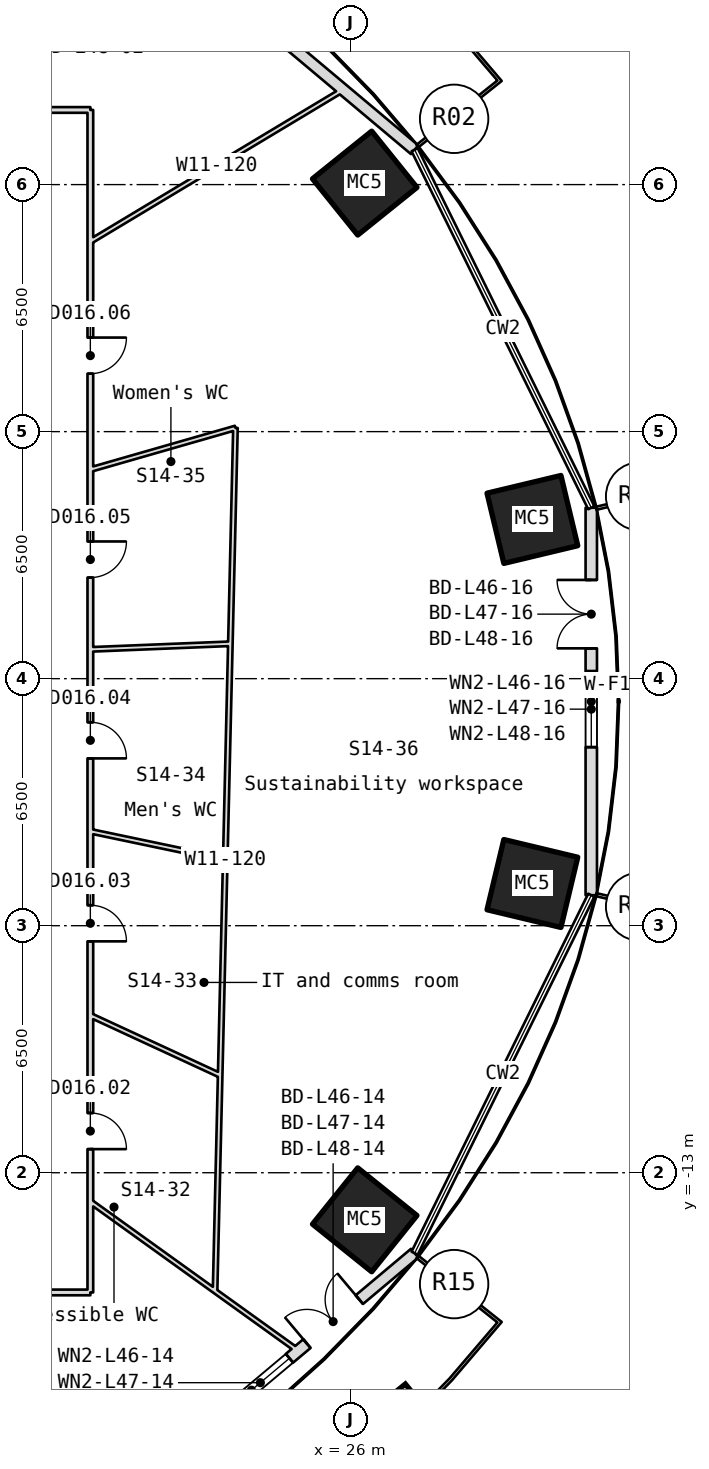
"""IFC4 building model, lengths in metres.
Left out: names, types, materials, properties, quantities, classifications, styles, units other than length and angle.
Written with IfcOpenShell. Run it as: python <this file> out.ifc"""

import sys

from ifc_helpers import new_model, si_unit, direction, frame, frame_2d, origin, origin_2d, place, context, subcontext, project, spatial, rectangle, hollow_rectangle, extrude, element, fill, save


model = new_model("IFC4")
c1 = context("Model", 3, precision=1e-05, world=origin(), true_north=direction((0.0, 1.0)))
c2 = subcontext(c1, "Body", "Model", "MODEL_VIEW")
j1 = project(units=[si_unit("LENGTHUNIT", "METRE"), si_unit("PLANEANGLEUNIT", "RADIAN")], contexts=[c1])
p1 = place(None, origin())
s1 = spatial("IfcSite", under=j1, at=p1, CompositionType="ELEMENT")
p2 = place(p1, origin())
s2 = spatial("IfcBuilding", under=s1, at=p2, CompositionType="ELEMENT")
p3 = place(p2, frame((0.0, 0.0, 210.85)))
s3 = spatial("IfcBuildingStorey", under=s2, at=p3, CompositionType="ELEMENT", Elevation=210.85)
for number, where, z_axis, x_axis in (
    (1, (30.782, 4.189, -0.18), (0.0, 0.0, 1.0), (0.233, -0.973, 0.0)),
    (2, (26.37, 13.039, -0.18), (0.0, 0.0, 1.0), (0.627, -0.779, 0.0)),
    (3, (26.37, -14.239, -0.18), (0.0, 0.0, 1.0), (-0.627, -0.779, 0.0)),
    (4, (30.782, -5.389, -0.18), (0.0, 0.0, 1.0), (-0.233, -0.973, 0.0)),
):
    element("IfcColumn", number, at=place(p3, frame(where, z_axis=z_axis, x_axis=x_axis)), inside=s3, PredefinedType="COLUMN", context=c2, shape_type="SweptSolid", body=[
        extrude(hollow_rectangle(XDim=1.9, YDim=2.0, WallThickness=0.07, at=origin_2d()), origin(), (0.0, 0.0, 1.0), 4.15),
    ])
p4 = place(p3, frame((27.684, 13.917, 0.0), z_axis=(0.0, 0.0, 1.0), x_axis=(-0.76593385613, 0.642919379109, 0.0)))
e5 = element("IfcWall", 5, at=p4, inside=s3, PredefinedType="SOLIDWALL", context=c2, shape_type="SweptSolid", body=[
    extrude(rectangle(XDim=11.213, YDim=0.3, at=frame_2d((5.607, 0.0))), origin(), (0.0, 0.0, 1.0), 3.97),
])
p5 = place(p4, frame((7.513, 0.0, 0.0)))
e6 = element("IfcOpeningElement", 6, at=p5, cuts=e5, PredefinedType="OPENING", context=c2, shape_type="SweptSolid", body=[
    extrude(rectangle(XDim=1.8, YDim=2.4, at=frame_2d((0.9, 1.2))), frame((0.0, 0.16, 0.0), z_axis=(0.0, -1.0, 0.0), x_axis=(1.0, 0.0, 0.0)), (0.0, 0.0, 1.0), 0.32),
])
p6 = place(p4, frame((4.913, 0.0, 0.9)))
e7 = element("IfcOpeningElement", 7, at=p6, cuts=e5, PredefinedType="OPENING", context=c2, shape_type="SweptSolid", body=[
    extrude(rectangle(XDim=2.0, YDim=1.5, at=frame_2d((1.0, 0.75))), frame((0.0, 0.16, 0.0), z_axis=(0.0, -1.0, 0.0), x_axis=(1.0, 0.0, 0.0)), (0.0, 0.0, 1.0), 0.32),
])
p7 = place(p3, frame((19.095, -22.326, 0.0), z_axis=(0.0, 0.0, 1.0), x_axis=(0.76593385613, 0.642919379109, 0.0)))
e8 = element("IfcWall", 8, at=p7, inside=s3, PredefinedType="SOLIDWALL", context=c2, shape_type="SweptSolid", body=[
    extrude(rectangle(XDim=11.213, YDim=0.3, at=frame_2d((5.607, 0.0))), origin(), (0.0, 0.0, 1.0), 3.97),
])
p8 = place(p7, frame((7.513, 0.0, 0.0)))
e9 = element("IfcOpeningElement", 9, at=p8, cuts=e8, PredefinedType="OPENING", context=c2, shape_type="SweptSolid", body=[
    extrude(rectangle(XDim=1.8, YDim=2.4, at=frame_2d((0.9, 1.2))), frame((0.0, 0.16, 0.0), z_axis=(0.0, -1.0, 0.0), x_axis=(1.0, 0.0, 0.0)), (0.0, 0.0, 1.0), 0.32),
])
p9 = place(p7, frame((4.913, 0.0, 0.9)))
e10 = element("IfcOpeningElement", 10, at=p9, cuts=e8, PredefinedType="OPENING", context=c2, shape_type="SweptSolid", body=[
    extrude(rectangle(XDim=2.0, YDim=1.5, at=frame_2d((1.0, 0.75))), frame((0.0, 0.16, 0.0), z_axis=(0.0, -1.0, 0.0), x_axis=(1.0, 0.0, 0.0)), (0.0, 0.0, 1.0), 0.32),
])
p10 = place(p3, frame((32.332, -5.698, 0.0), z_axis=(0.0, 0.0, 1.0), x_axis=(0.0, 1.0, 0.0)))
e11 = element("IfcWall", 11, at=p10, inside=s3, PredefinedType="SOLIDWALL", context=c2, shape_type="SweptSolid", body=[
    extrude(rectangle(XDim=10.196, YDim=0.3, at=frame_2d((5.098, 0.0))), origin(), (0.0, 0.0, 1.0), 3.97),
])
p11 = place(p10, frame((6.495, 0.0, 0.0)))
e12 = element("IfcOpeningElement", 12, at=p11, cuts=e11, PredefinedType="OPENING", context=c2, shape_type="SweptSolid", body=[
    extrude(rectangle(XDim=1.8, YDim=2.4, at=frame_2d((0.9, 1.2))), frame((0.0, 0.16, 0.0), z_axis=(0.0, -1.0, 0.0), x_axis=(1.0, 0.0, 0.0)), (0.0, 0.0, 1.0), 0.32),
])
p12 = place(p10, frame((3.896, 0.0, 0.9)))
e13 = element("IfcOpeningElement", 13, at=p12, cuts=e11, PredefinedType="OPENING", context=c2, shape_type="SweptSolid", body=[
    extrude(rectangle(XDim=2.0, YDim=1.5, at=frame_2d((1.0, 0.75))), frame((0.0, 0.16, 0.0), z_axis=(0.0, -1.0, 0.0), x_axis=(1.0, 0.0, 0.0)), (0.0, 0.0, 1.0), 0.32),
])
p13 = place(p3, frame((16.45, 14.964, 0.0), z_axis=(0.0, 0.0, 1.0), x_axis=(1.0, 0.0, 0.0)))
e14 = element("IfcWall", 14, at=p13, inside=s3, PredefinedType="PARTITIONING", context=c2, shape_type="SweptSolid", body=[
    extrude(rectangle(XDim=2.7, YDim=0.15, at=frame_2d((1.35, 0.0))), origin(), (0.0, 0.0, 1.0), 3.97),
])
p14 = place(p3, frame((19.15, -16.15, 0.0), z_axis=(0.0, 0.0, 1.0), x_axis=(-1.0, 0.0, 0.0)))
e15 = element("IfcWall", 15, at=p14, inside=s3, PredefinedType="PARTITIONING", context=c2, shape_type="SweptSolid", body=[
    extrude(rectangle(XDim=38.3, YDim=0.15, at=frame_2d((19.15, 0.0))), origin(), (0.0, 0.0, 1.0), 3.97),
])
p15 = place(p14, frame((19.581, 0.0, 0.0)))
e16 = element("IfcOpeningElement", 16, at=p15, cuts=e15, PredefinedType="OPENING", context=c2, shape_type="SweptSolid", body=[
    extrude(rectangle(XDim=0.95, YDim=2.1, at=frame_2d((0.475, 1.05))), frame((0.0, 0.085, 0.0), z_axis=(0.0, -1.0, 0.0), x_axis=(1.0, 0.0, 0.0)), (0.0, 0.0, 1.0), 0.17),
])
p16 = place(p14, frame((6.981, 0.0, 0.0)))
e17 = element("IfcOpeningElement", 17, at=p16, cuts=e15, PredefinedType="OPENING", context=c2, shape_type="SweptSolid", body=[
    extrude(rectangle(XDim=1.8, YDim=2.1, at=frame_2d((0.9, 1.05))), frame((0.0, 0.085, 0.0), z_axis=(0.0, -1.0, 0.0), x_axis=(1.0, 0.0, 0.0)), (0.0, 0.0, 1.0), 0.17),
])
p17 = place(p3, frame((19.15, -13.759, 0.0), z_axis=(0.0, 0.0, 1.0), x_axis=(0.812128627043, -0.583478442736, 0.0)))
e18 = element("IfcWall", 18, at=p17, inside=s3, PredefinedType="PARTITIONING", context=c2, shape_type="SweptSolid", body=[
    extrude(rectangle(XDim=6.735, YDim=0.12, at=frame_2d((3.368, 0.0))), origin(), (0.0, 0.0, 1.0), 3.97),
])
p18 = place(p3, frame((19.15, 11.501, 0.0), z_axis=(0.0, 0.0, 1.0), x_axis=(0.857259644741, 0.514884357404, 0.0)))
e19 = element("IfcWall", 19, at=p18, inside=s3, PredefinedType="PARTITIONING", context=c2, shape_type="SweptSolid", body=[
    extrude(rectangle(XDim=7.76, YDim=0.12, at=frame_2d((3.88, 0.0))), origin(), (0.0, 0.0, 1.0), 3.97),
])
p19 = place(p3, frame((19.15, 14.964, 0.0), z_axis=(0.0, 0.0, 1.0), x_axis=(0.0, -1.0, 0.0)))
e20 = element("IfcWall", 20, at=p19, inside=s3, PredefinedType="PARTITIONING", context=c2, shape_type="SweptSolid", body=[
    extrude(rectangle(XDim=31.114, YDim=0.15, at=frame_2d((15.557, 0.0))), origin(), (0.0, 0.0, 1.0), 3.97),
])
p20 = place(p19, frame((26.393, 0.0, 0.0)))
e21 = element("IfcOpeningElement", 21, at=p20, cuts=e20, PredefinedType="OPENING", context=c2, shape_type="SweptSolid", body=[
    extrude(rectangle(XDim=0.95, YDim=2.1, at=frame_2d((0.475, 1.05))), frame((0.0, 0.085, 0.0), z_axis=(0.0, -1.0, 0.0), x_axis=(1.0, 0.0, 0.0)), (0.0, 0.0, 1.0), 0.17),
])
p21 = place(p19, frame((20.926, 0.0, 0.0)))
e22 = element("IfcOpeningElement", 22, at=p21, cuts=e20, PredefinedType="OPENING", context=c2, shape_type="SweptSolid", body=[
    extrude(rectangle(XDim=0.95, YDim=2.1, at=frame_2d((0.475, 1.05))), frame((0.0, 0.085, 0.0), z_axis=(0.0, -1.0, 0.0), x_axis=(1.0, 0.0, 0.0)), (0.0, 0.0, 1.0), 0.17),
])
p22 = place(p19, frame((16.112, 0.0, 0.0)))
e23 = element("IfcOpeningElement", 23, at=p22, cuts=e20, PredefinedType="OPENING", context=c2, shape_type="SweptSolid", body=[
    extrude(rectangle(XDim=0.95, YDim=2.1, at=frame_2d((0.475, 1.05))), frame((0.0, 0.085, 0.0), z_axis=(0.0, -1.0, 0.0), x_axis=(1.0, 0.0, 0.0)), (0.0, 0.0, 1.0), 0.17),
])
p23 = place(p19, frame((11.354, 0.0, 0.0)))
e24 = element("IfcOpeningElement", 24, at=p23, cuts=e20, PredefinedType="OPENING", context=c2, shape_type="SweptSolid", body=[
    extrude(rectangle(XDim=0.95, YDim=2.1, at=frame_2d((0.475, 1.05))), frame((0.0, 0.085, 0.0), z_axis=(0.0, -1.0, 0.0), x_axis=(1.0, 0.0, 0.0)), (0.0, 0.0, 1.0), 0.17),
])
p24 = place(p19, frame((5.989, 0.0, 0.0)))
e25 = element("IfcOpeningElement", 25, at=p24, cuts=e20, PredefinedType="OPENING", context=c2, shape_type="SweptSolid", body=[
    extrude(rectangle(XDim=0.95, YDim=2.1, at=frame_2d((0.475, 1.05))), frame((0.0, 0.085, 0.0), z_axis=(0.0, -1.0, 0.0), x_axis=(1.0, 0.0, 0.0)), (0.0, 0.0, 1.0), 0.17),
])
p25 = place(p3, frame((22.432, -16.117, 0.0), z_axis=(0.0, 0.0, 1.0), x_axis=(0.023619180301, 0.999721028248, 0.0)))
e26 = element("IfcWall", 26, at=p25, inside=s3, PredefinedType="PARTITIONING", context=c2, shape_type="SweptSolid", body=[
    extrude(rectangle(XDim=22.72, YDim=0.12, at=frame_2d((11.36, 0.0))), origin(), (0.0, 0.0, 1.0), 3.97),
])
p26 = place(p3, frame((22.566, -10.438, 0.0), z_axis=(0.0, 0.0, 1.0), x_axis=(-0.907596457225, 0.419843626643, 0.0)))
e27 = element("IfcWall", 27, at=p26, inside=s3, PredefinedType="PARTITIONING", context=c2, shape_type="SweptSolid", body=[
    extrude(rectangle(XDim=3.764, YDim=0.12, at=frame_2d((1.882, 0.0))), origin(), (0.0, 0.0, 1.0), 3.97),
])
p27 = place(p3, frame((22.7, -4.76, 0.0), z_axis=(0.0, 0.0, 1.0), x_axis=(-0.978705174883, 0.205270993219, 0.0)))
e28 = element("IfcWall", 28, at=p27, inside=s3, PredefinedType="PARTITIONING", context=c2, shape_type="SweptSolid", body=[
    extrude(rectangle(XDim=3.627, YDim=0.12, at=frame_2d((1.814, 0.0))), origin(), (0.0, 0.0, 1.0), 3.97),
])
p28 = place(p3, frame((22.834, 0.918, 0.0), z_axis=(0.0, 0.0, 1.0), x_axis=(-0.999192156412, -0.040187492641, 0.0)))
e29 = element("IfcWall", 29, at=p28, inside=s3, PredefinedType="PARTITIONING", context=c2, shape_type="SweptSolid", body=[
    extrude(rectangle(XDim=3.688, YDim=0.12, at=frame_2d((1.844, 0.0))), origin(), (0.0, 0.0, 1.0), 3.97),
])
p29 = place(p3, frame((22.969, 6.597, 0.0), z_axis=(0.0, 0.0, 1.0), x_axis=(-0.961147388984, -0.276035680028, 0.0)))
e30 = element("IfcWall", 30, at=p29, inside=s3, PredefinedType="PARTITIONING", context=c2, shape_type="SweptSolid", body=[
    extrude(rectangle(XDim=3.973, YDim=0.12, at=frame_2d((1.986, 0.0))), origin(), (0.0, 0.0, 1.0), 3.97),
])
p30 = place(p8, origin())
e31 = element("IfcDoor", 31, at=p30, inside=s3, OperationType="SINGLE_SWING_LEFT", PredefinedType="DOOR", context=c2, shape_type="SweptSolid", body=[
    extrude(rectangle(XDim=1.8, YDim=2.4, at=frame_2d((0.9, 1.2))), frame((0.0, 0.025, 0.0), z_axis=(0.0, -1.0, 0.0), x_axis=(1.0, 0.0, 0.0)), (0.0, 0.0, 1.0), 0.05),
])
fill(e9, e31)
p31 = place(p9, origin())
e32 = element("IfcWindow", 32, at=p31, inside=s3, PartitioningType="SINGLE_PANEL", PredefinedType="WINDOW", context=c2, shape_type="SweptSolid", body=[
    extrude(rectangle(XDim=2.0, YDim=1.5, at=frame_2d((1.0, 0.75))), frame((0.0, 0.03, 0.0), z_axis=(0.0, -1.0, 0.0), x_axis=(1.0, 0.0, 0.0)), (0.0, 0.0, 1.0), 0.06),
])
fill(e10, e32)
p32 = place(p11, origin())
e33 = element("IfcDoor", 33, at=p32, inside=s3, OperationType="SINGLE_SWING_LEFT", PredefinedType="DOOR", context=c2, shape_type="SweptSolid", body=[
    extrude(rectangle(XDim=1.8, YDim=2.4, at=frame_2d((0.9, 1.2))), frame((0.0, 0.025, 0.0), z_axis=(0.0, -1.0, 0.0), x_axis=(1.0, 0.0, 0.0)), (0.0, 0.0, 1.0), 0.05),
])
fill(e12, e33)
p33 = place(p12, origin())
e34 = element("IfcWindow", 34, at=p33, inside=s3, PartitioningType="SINGLE_PANEL", PredefinedType="WINDOW", context=c2, shape_type="SweptSolid", body=[
    extrude(rectangle(XDim=2.0, YDim=1.5, at=frame_2d((1.0, 0.75))), frame((0.0, 0.03, 0.0), z_axis=(0.0, -1.0, 0.0), x_axis=(1.0, 0.0, 0.0)), (0.0, 0.0, 1.0), 0.06),
])
fill(e13, e34)
p34 = place(p20, origin())
e35 = element("IfcDoor", 35, at=p34, inside=s3, OperationType="SINGLE_SWING_RIGHT", PredefinedType="DOOR", context=c2, shape_type="SweptSolid", body=[
    extrude(rectangle(XDim=0.95, YDim=2.1, at=frame_2d((0.475, 1.05))), frame((0.0, 0.025, 0.0), z_axis=(0.0, -1.0, 0.0), x_axis=(1.0, 0.0, 0.0)), (0.0, 0.0, 1.0), 0.05),
])
fill(e21, e35)
p35 = place(p21, origin())
e36 = element("IfcDoor", 36, at=p35, inside=s3, OperationType="SINGLE_SWING_RIGHT", PredefinedType="DOOR", context=c2, shape_type="SweptSolid", body=[
    extrude(rectangle(XDim=0.95, YDim=2.1, at=frame_2d((0.475, 1.05))), frame((0.0, 0.025, 0.0), z_axis=(0.0, -1.0, 0.0), x_axis=(1.0, 0.0, 0.0)), (0.0, 0.0, 1.0), 0.05),
])
fill(e22, e36)
p36 = place(p22, origin())
e37 = element("IfcDoor", 37, at=p36, inside=s3, OperationType="SINGLE_SWING_RIGHT", PredefinedType="DOOR", context=c2, shape_type="SweptSolid", body=[
    extrude(rectangle(XDim=0.95, YDim=2.1, at=frame_2d((0.475, 1.05))), frame((0.0, 0.025, 0.0), z_axis=(0.0, -1.0, 0.0), x_axis=(1.0, 0.0, 0.0)), (0.0, 0.0, 1.0), 0.05),
])
fill(e23, e37)
p37 = place(p23, origin())
e38 = element("IfcDoor", 38, at=p37, inside=s3, OperationType="SINGLE_SWING_RIGHT", PredefinedType="DOOR", context=c2, shape_type="SweptSolid", body=[
    extrude(rectangle(XDim=0.95, YDim=2.1, at=frame_2d((0.475, 1.05))), frame((0.0, 0.025, 0.0), z_axis=(0.0, -1.0, 0.0), x_axis=(1.0, 0.0, 0.0)), (0.0, 0.0, 1.0), 0.05),
])
fill(e24, e38)
p38 = place(p24, origin())
e39 = element("IfcDoor", 39, at=p38, inside=s3, OperationType="SINGLE_SWING_RIGHT", PredefinedType="DOOR", context=c2, shape_type="SweptSolid", body=[
    extrude(rectangle(XDim=0.95, YDim=2.1, at=frame_2d((0.475, 1.05))), frame((0.0, 0.025, 0.0), z_axis=(0.0, -1.0, 0.0), x_axis=(1.0, 0.0, 0.0)), (0.0, 0.0, 1.0), 0.05),
])
fill(e25, e39)
save(model, sys.argv[1])
